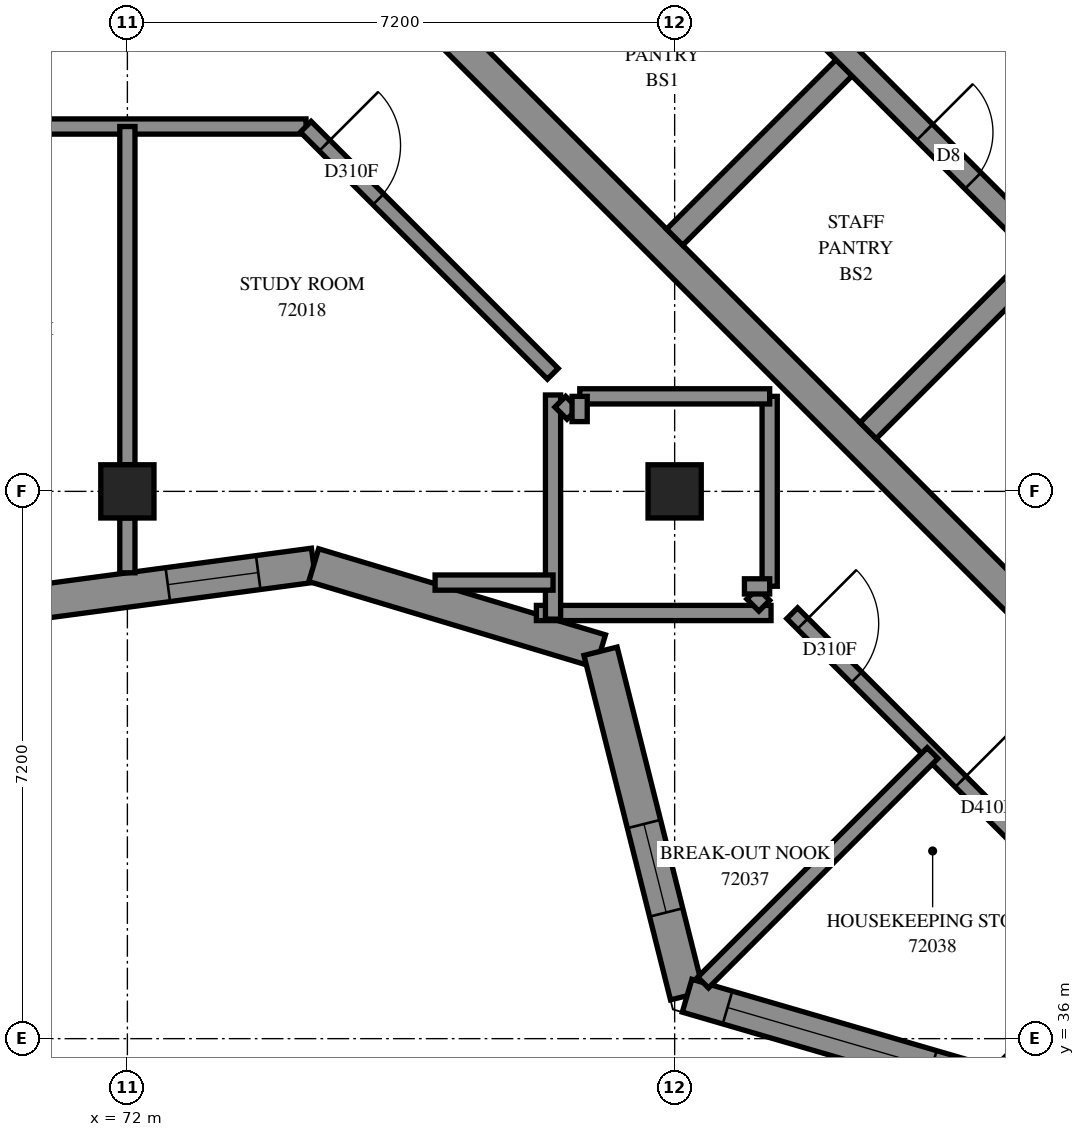
"""IFC4 building model, lengths in metres.
Left out: names, types, materials, properties, quantities, classifications, styles, units other than length and angle.
Written with IfcOpenShell. Run it as: python <this file> out.ifc"""

import sys

from ifc_helpers import new_model, si_unit, direction, frame, frame_2d, origin, origin_2d, place, context, subcontext, project, spatial, polyline, rectangle, outline, extrude, element, fill, save


model = new_model("IFC4")
c1 = context("Model", 3, precision=1e-05, world=origin(), true_north=direction((0.0, 1.0)))
c2 = subcontext(c1, "Body", "Model", "MODEL_VIEW")
j1 = project(units=[si_unit("LENGTHUNIT", "METRE"), si_unit("PLANEANGLEUNIT", "RADIAN")], contexts=[c1])
p1 = place(None, origin())
s1 = spatial("IfcSite", under=j1, at=p1, CompositionType="ELEMENT")
p2 = place(p1, origin())
s2 = spatial("IfcBuilding", under=s1, at=p2, CompositionType="ELEMENT")
p3 = place(p2, frame((0.0, 0.0, 264.2)))
s3 = spatial("IfcBuildingStorey", under=s2, at=p3, CompositionType="ELEMENT", Elevation=264.2)
for number, where, z_axis, x_axis in (
    (1, (72.0, 43.2, 0.0), (0.0, 0.0, 1.0), (1.0, 0.0, 0.0)),
    (2, (79.2, 43.2, 0.0), (0.0, 0.0, 1.0), (1.0, 0.0, 0.0)),
):
    element("IfcColumn", number, at=place(p3, frame(where, z_axis=z_axis, x_axis=x_axis)), inside=s3, PredefinedType="COLUMN", context=c2, shape_type="SweptSolid", body=[
        extrude(rectangle(XDim=0.7, YDim=0.7, at=origin_2d()), origin(), (0.0, 0.0, 1.0), 3.1),
    ])
p4 = place(p3, frame((76.23, 49.231, -0.3), z_axis=(0.0, 0.0, 1.0), x_axis=(0.7071034917, -0.7071100706, 0.0)))
e3 = element("IfcWall", 3, at=p4, inside=s3, PredefinedType="SHEAR", context=c2, shape_type="SweptSolid", body=[
    extrude(rectangle(XDim=15.2, YDim=0.4, at=frame_2d((7.6, 0.0))), origin(), (0.0, 0.0, 1.0), 2.7),
])
p5 = place(p3, frame((79.2, 46.544, 0.0), z_axis=(0.0, 0.0, 1.0), x_axis=(0.7071219326, 0.7070916295, 0.0)))
e4 = element("IfcWall", 4, at=p5, inside=s3, PredefinedType="SOLIDWALL", context=c2, shape_type="SweptSolid", body=[
    extrude(rectangle(XDim=3.3, YDim=0.3, at=frame_2d((1.65, 0.0))), origin(), (0.0, 0.0, 1.0), 3.1),
])
p6 = place(p3, frame((81.746, 43.999, 0.0), z_axis=(0.0, 0.0, 1.0), x_axis=(0.7071067812, 0.7071067812, 0.0)))
e5 = element("IfcWall", 5, at=p6, inside=s3, PredefinedType="SOLIDWALL", context=c2, shape_type="SweptSolid", body=[
    extrude(rectangle(XDim=3.3, YDim=0.3, at=frame_2d((1.65, 0.0))), origin(), (0.0, 0.0, 1.0), 3.1),
])
p7 = place(p3, frame((78.988, 51.423, 0.0), z_axis=(0.0, 0.0, 1.0), x_axis=(0.7071067812, -0.7071067812, 0.0)))
e6 = element("IfcWall", 6, at=p7, inside=s3, PredefinedType="SOLIDWALL", context=c2, shape_type="SweptSolid", body=[
    extrude(rectangle(XDim=14.4, YDim=0.3, at=frame_2d((7.2, 0.0))), origin(), (0.0, 0.0, 1.0), 3.1),
])
p8 = place(p7, frame((1.35, 0.0, 0.0)))
e7 = element("IfcOpeningElement", 7, at=p8, cuts=e6, PredefinedType="OPENING", context=c2, shape_type="SweptSolid", body=[
    extrude(rectangle(XDim=0.9, YDim=2.1, at=frame_2d((0.45, 1.05))), frame((0.0, 0.16, 0.0), z_axis=(0.0, -1.0, 0.0), x_axis=(1.0, 0.0, 0.0)), (0.0, 0.0, 1.0), 0.32),
])
p9 = place(p7, frame((4.95, 0.0, 0.0)))
e8 = element("IfcOpeningElement", 8, at=p9, cuts=e6, PredefinedType="OPENING", context=c2, shape_type="SweptSolid", body=[
    extrude(rectangle(XDim=0.9, YDim=2.1, at=frame_2d((0.45, 1.05))), frame((0.0, 0.16, 0.0), z_axis=(0.0, -1.0, 0.0), x_axis=(1.0, 0.0, 0.0)), (0.0, 0.0, 1.0), 0.32),
])
p10 = place(p7, frame((8.55, 0.0, 0.0)))
e9 = element("IfcOpeningElement", 9, at=p10, cuts=e6, PredefinedType="OPENING", context=c2, shape_type="SweptSolid", body=[
    extrude(rectangle(XDim=0.9, YDim=2.1, at=frame_2d((0.45, 1.05))), frame((0.0, 0.16, 0.0), z_axis=(0.0, -1.0, 0.0), x_axis=(1.0, 0.0, 0.0)), (0.0, 0.0, 1.0), 0.32),
])
p11 = place(p7, frame((12.05, 0.0, 0.0)))
e10 = element("IfcOpeningElement", 10, at=p11, cuts=e6, PredefinedType="OPENING", context=c2, shape_type="SweptSolid", body=[
    extrude(rectangle(XDim=1.1, YDim=2.1, at=frame_2d((0.55, 1.05))), frame((0.0, 0.16, 0.0), z_axis=(0.0, -1.0, 0.0), x_axis=(1.0, 0.0, 0.0)), (0.0, 0.0, 1.0), 0.32),
])
p12 = place(p3, frame((81.534, 53.969, 0.0), z_axis=(0.0, 0.0, 1.0), x_axis=(0.707103309, -0.7071102534, 0.0)))
e11 = element("IfcWall", 11, at=p12, inside=s3, PredefinedType="SOLIDWALL", context=c2, shape_type="SweptSolid", body=[
    extrude(rectangle(XDim=14.4, YDim=0.3, at=frame_2d((7.2, 0.0))), origin(), (0.0, 0.0, 1.0), 3.1),
])
p13 = place(p12, frame((8.55, 0.0, 0.0)))
e12 = element("IfcOpeningElement", 12, at=p13, cuts=e11, PredefinedType="OPENING", context=c2, shape_type="SweptSolid", body=[
    extrude(rectangle(XDim=0.9, YDim=2.1, at=frame_2d((0.45, 1.05))), frame((0.0, 0.16, 0.0), z_axis=(0.0, -1.0, 0.0), x_axis=(1.0, 0.0, 0.0)), (0.0, 0.0, 1.0), 0.32),
])
p14 = place(p12, frame((1.25, 0.0, 0.0)))
e13 = element("IfcOpeningElement", 13, at=p14, cuts=e11, PredefinedType="OPENING", context=c2, shape_type="SweptSolid", body=[
    extrude(rectangle(XDim=1.1, YDim=2.1, at=frame_2d((0.55, 1.05))), frame((0.0, 0.16, 0.0), z_axis=(0.0, -1.0, 0.0), x_axis=(1.0, 0.0, 0.0)), (0.0, 0.0, 1.0), 0.32),
])
p15 = place(p12, frame((4.85, 0.0, 0.0)))
e14 = element("IfcOpeningElement", 14, at=p15, cuts=e11, PredefinedType="OPENING", context=c2, shape_type="SweptSolid", body=[
    extrude(rectangle(XDim=1.1, YDim=2.1, at=frame_2d((0.55, 1.05))), frame((0.0, 0.16, 0.0), z_axis=(0.0, -1.0, 0.0), x_axis=(1.0, 0.0, 0.0)), (0.0, 0.0, 1.0), 0.32),
])
p16 = place(p12, frame((12.05, 0.0, 0.0)))
e15 = element("IfcOpeningElement", 15, at=p16, cuts=e11, PredefinedType="OPENING", context=c2, shape_type="SweptSolid", body=[
    extrude(rectangle(XDim=1.1, YDim=2.1, at=frame_2d((0.55, 1.05))), frame((0.0, 0.16, 0.0), z_axis=(0.0, -1.0, 0.0), x_axis=(1.0, 0.0, 0.0)), (0.0, 0.0, 1.0), 0.32),
])
p17 = place(p3, frame((70.828, 41.745, 0.0), z_axis=(0.0, 0.0, 1.0), x_axis=(0.991180049, 0.1325221131, 0.0)))
e16 = element("IfcWall", 16, at=p17, inside=s3, PredefinedType="SOLIDWALL", context=c2, shape_type="SweptSolid", body=[
    extrude(outline(polyline([(-0.03, -0.225), (3.607, -0.225), (3.704, 0.225), (0.03, 0.225), (-0.03, -0.225)])), origin(), (0.0, 0.0, 1.0), 3.1),
])
p18 = place(p17, frame((1.719, 0.0, 0.45)))
e17 = element("IfcOpeningElement", 17, at=p18, cuts=e16, PredefinedType="OPENING", context=c2, shape_type="SweptSolid", body=[
    extrude(rectangle(XDim=1.2, YDim=2.55, at=frame_2d((0.6, 1.275))), frame((0.0, 0.235, 0.0), z_axis=(0.0, -1.0, 0.0), x_axis=(1.0, 0.0, 0.0)), (0.0, 0.0, 1.0), 0.47),
])
p19 = place(p3, frame((74.451, 42.229, 0.0), z_axis=(0.0, 0.0, 1.0), x_axis=(0.957789952, -0.2874689685, 0.0)))
e18 = element("IfcWall", 18, at=p19, inside=s3, PredefinedType="SOLIDWALL", context=c2, shape_type="SweptSolid", body=[
    extrude(outline(polyline([(0.049, -0.225), (3.812, -0.225), (4.068, 0.225), (-0.049, 0.225), (0.049, -0.225)])), origin(), (0.0, 0.0, 1.0), 3.1),
])
p20 = place(p3, frame((78.225, 41.097, 0.0), z_axis=(0.0, 0.0, 1.0), x_axis=(0.2436835103, -0.9698548071, 0.0)))
e19 = element("IfcWall", 19, at=p20, inside=s3, PredefinedType="SOLIDWALL", context=c2, shape_type="SweptSolid", body=[
    extrude(outline(polyline([(0.128, -0.225), (4.802, -0.225), (4.544, 0.225), (-0.128, 0.225), (0.128, -0.225)])), origin(), (0.0, 0.0, 1.0), 3.1),
])
p21 = place(p20, frame((2.344, 0.0, 0.45)))
e20 = element("IfcOpeningElement", 20, at=p21, cuts=e19, PredefinedType="OPENING", context=c2, shape_type="SweptSolid", body=[
    extrude(rectangle(XDim=1.2, YDim=2.55, at=frame_2d((0.6, 1.275))), frame((0.0, 0.235, 0.0), z_axis=(0.0, -1.0, 0.0), x_axis=(1.0, 0.0, 0.0)), (0.0, 0.0, 1.0), 0.47),
])
p22 = place(p3, frame((79.364, 36.565, 0.0), z_axis=(0.0, 0.0, 1.0), x_axis=(0.9600215683, -0.2799260409, 0.0)))
e21 = element("IfcWall", 21, at=p22, inside=s3, PredefinedType="SOLIDWALL", context=c2, shape_type="SweptSolid", body=[
    extrude(outline(polyline([(-0.129, -0.225), (4.446, -0.225), (4.692, 0.225), (0.129, 0.225), (-0.129, -0.225)])), origin(), (0.0, 0.0, 1.0), 3.1),
])
p23 = place(p22, frame((0.554, 0.0, 0.45)))
e22 = element("IfcOpeningElement", 22, at=p23, cuts=e21, PredefinedType="OPENING", context=c2, shape_type="SweptSolid", body=[
    extrude(rectangle(XDim=2.8, YDim=2.55, at=frame_2d((1.4, 1.275))), frame((0.0, 0.235, 0.0), z_axis=(0.0, -1.0, 0.0), x_axis=(1.0, 0.0, 0.0)), (0.0, 0.0, 1.0), 0.47),
])
p24 = place(p3, frame((55.2, 48.0, 0.0), z_axis=(0.0, 0.0, 1.0), x_axis=(1.0, 0.0, 0.0)))
e23 = element("IfcWall", 23, at=p24, inside=s3, PredefinedType="PARTITIONING", context=c2, shape_type="SweptSolid", body=[
    extrude(rectangle(XDim=19.15, YDim=0.2, at=frame_2d((9.575, 0.0))), origin(), (0.0, 0.0, 1.0), 3.1),
])
p25 = place(p24, frame((4.475, 0.0, 0.0)))
e24 = element("IfcOpeningElement", 24, at=p25, cuts=e23, PredefinedType="OPENING", context=c2, shape_type="SweptSolid", body=[
    extrude(rectangle(XDim=1.0, YDim=2.1, at=frame_2d((0.5, 1.05))), frame((0.0, 0.11, 0.0), z_axis=(0.0, -1.0, 0.0), x_axis=(1.0, 0.0, 0.0)), (0.0, 0.0, 1.0), 0.22),
])
p26 = place(p24, frame((8.338, 0.0, 0.0)))
e25 = element("IfcOpeningElement", 25, at=p26, cuts=e23, PredefinedType="OPENING", context=c2, shape_type="SweptSolid", body=[
    extrude(rectangle(XDim=1.0, YDim=2.1, at=frame_2d((0.5, 1.05))), frame((0.0, 0.11, 0.0), z_axis=(0.0, -1.0, 0.0), x_axis=(1.0, 0.0, 0.0)), (0.0, 0.0, 1.0), 0.22),
])
p27 = place(p24, frame((13.707, 0.0, 0.0)))
e26 = element("IfcOpeningElement", 26, at=p27, cuts=e23, PredefinedType="OPENING", context=c2, shape_type="SweptSolid", body=[
    extrude(rectangle(XDim=1.0, YDim=2.1, at=frame_2d((0.5, 1.05))), frame((0.0, 0.11, 0.0), z_axis=(0.0, -1.0, 0.0), x_axis=(1.0, 0.0, 0.0)), (0.0, 0.0, 1.0), 0.22),
])
p28 = place(p3, frame((80.747, 41.597, 0.0), z_axis=(0.0, 0.0, 1.0), x_axis=(0.7071067812, -0.7071067812, 0.0)))
e27 = element("IfcWall", 27, at=p28, inside=s3, PredefinedType="PARTITIONING", context=c2, shape_type="SweptSolid", body=[
    extrude(rectangle(XDim=8.607, YDim=0.2, at=frame_2d((4.303, 0.0))), origin(), (0.0, 0.0, 1.0), 3.1),
])
p29 = place(p28, frame((0.195, 0.0, 0.0)))
e28 = element("IfcOpeningElement", 28, at=p29, cuts=e27, PredefinedType="OPENING", context=c2, shape_type="SweptSolid", body=[
    extrude(rectangle(XDim=1.0, YDim=2.1, at=frame_2d((0.5, 1.05))), frame((0.0, 0.11, 0.0), z_axis=(0.0, -1.0, 0.0), x_axis=(1.0, 0.0, 0.0)), (0.0, 0.0, 1.0), 0.22),
])
p30 = place(p28, frame((3.133, 0.0, 0.0)))
e29 = element("IfcOpeningElement", 29, at=p30, cuts=e27, PredefinedType="OPENING", context=c2, shape_type="SweptSolid", body=[
    extrude(rectangle(XDim=1.0, YDim=2.1, at=frame_2d((0.5, 1.05))), frame((0.0, 0.11, 0.0), z_axis=(0.0, -1.0, 0.0), x_axis=(1.0, 0.0, 0.0)), (0.0, 0.0, 1.0), 0.22),
])
p31 = place(p3, frame((74.347, 47.997, 0.0), z_axis=(0.0, 0.0, 1.0), x_axis=(0.7071067812, -0.7071067812, 0.0)))
e30 = element("IfcWall", 30, at=p31, inside=s3, PredefinedType="PARTITIONING", context=c2, shape_type="SweptSolid", body=[
    extrude(rectangle(XDim=4.596, YDim=0.2, at=frame_2d((2.298, 0.0))), origin(), (0.0, 0.0, 1.0), 3.1),
])
p32 = place(p31, frame((0.35, 0.0, 0.0)))
e31 = element("IfcOpeningElement", 31, at=p32, cuts=e30, PredefinedType="OPENING", context=c2, shape_type="SweptSolid", body=[
    extrude(rectangle(XDim=1.0, YDim=2.1, at=frame_2d((0.5, 1.05))), frame((0.0, 0.11, 0.0), z_axis=(0.0, -1.0, 0.0), x_axis=(1.0, 0.0, 0.0)), (0.0, 0.0, 1.0), 0.22),
])
p33 = place(p3, frame((72.0, 43.55, 0.0), z_axis=(0.0, 0.0, 1.0), x_axis=(0.0, 1.0, 0.0)))
e32 = element("IfcWall", 32, at=p33, inside=s3, PredefinedType="PARTITIONING", context=c2, shape_type="SweptSolid", body=[
    extrude(rectangle(XDim=4.45, YDim=0.2, at=frame_2d((2.225, 0.0))), origin(), (0.0, 0.0, 1.0), 3.1),
])
p34 = place(p3, frame((79.574, 36.738, 0.0), z_axis=(0.0, 0.0, 1.0), x_axis=(0.7071067812, 0.7071067812, 0.0)))
e33 = element("IfcWall", 33, at=p34, inside=s3, PredefinedType="PARTITIONING", context=c2, shape_type="SweptSolid", body=[
    extrude(rectangle(XDim=4.269, YDim=0.2, at=frame_2d((2.135, 0.0))), origin(), (0.0, 0.0, 1.0), 3.1),
])
p35 = place(p3, frame((77.381, 41.6, 0.0), z_axis=(0.0, 0.0, 1.0), x_axis=(1.0, 0.0, 0.0)))
e34 = element("IfcWall", 34, at=p35, inside=s3, PredefinedType="PARTITIONING", context=c2, shape_type="SweptSolid", body=[
    extrude(rectangle(XDim=3.087, YDim=0.2, at=frame_2d((1.543, 0.0))), origin(), (0.0, 0.0, 1.0), 3.1),
])
p36 = place(p3, frame((77.6, 41.519, 0.0), z_axis=(0.0, 0.0, 1.0), x_axis=(0.0, 1.0, 0.0)))
e35 = element("IfcWall", 35, at=p36, inside=s3, PredefinedType="PARTITIONING", context=c2, shape_type="SweptSolid", body=[
    extrude(rectangle(XDim=2.949, YDim=0.2, at=frame_2d((1.474, 0.0))), origin(), (0.0, 0.0, 1.0), 3.1),
])
for number, where, z_axis, x_axis in (
    (36, (80.45, 41.952, 0.0), (0.0, 0.0, 1.0), (0.0, 1.0, 0.0)),
    (37, (77.952, 44.45, 0.0), (0.0, 0.0, 1.0), (1.0, 0.0, 0.0)),
):
    element("IfcWall", number, at=place(p3, frame(where, z_axis=z_axis, x_axis=x_axis)), inside=s3, PredefinedType="PARTITIONING", context=c2, shape_type="SweptSolid", body=[
        extrude(rectangle(XDim=2.498, YDim=0.2, at=frame_2d((1.249, 0.0))), origin(), (0.0, 0.0, 1.0), 3.1),
    ])
p37 = place(p3, frame((76.048, 42.0, 0.0), z_axis=(0.0, 0.0, 1.0), x_axis=(1.0, 0.0, 0.0)))
e38 = element("IfcWall", 38, at=p37, inside=s3, PredefinedType="PARTITIONING", context=c2, shape_type="SweptSolid", body=[
    extrude(rectangle(XDim=1.552, YDim=0.2, at=frame_2d((0.776, 0.0))), origin(), (0.0, 0.0, 1.0), 3.1),
])
p38 = place(p3, frame((72.0, 42.129, 0.0), z_axis=(0.0, 0.0, 1.0), x_axis=(0.0, 1.0, 0.0)))
e39 = element("IfcWall", 39, at=p38, inside=s3, PredefinedType="PARTITIONING", context=c2, shape_type="SweptSolid", body=[
    extrude(rectangle(XDim=0.721, YDim=0.2, at=frame_2d((0.361, 0.0))), origin(), (0.0, 0.0, 1.0), 3.1),
])
p39 = place(p3, frame((83.516, 35.588, 0.0), z_axis=(0.0, 0.0, 1.0), x_axis=(0.7070235383, 0.7071900143, 0.0)))
e40 = element("IfcWall", 40, at=p39, inside=s3, PredefinedType="PARTITIONING", context=c2, shape_type="SweptSolid", body=[
    extrude(rectangle(XDim=0.601, YDim=0.2, at=frame_2d((0.3, 0.0))), origin(), (0.0, 0.0, 1.0), 3.1),
])
for number, where, z_axis, x_axis in (
    (41, (80.221, 41.855, 0.0), (0.0, 0.0, 1.0), (0.707, -0.707, 0.0)),
    (42, (77.695, 44.38, 0.0), (0.0, 0.0, 1.0), (0.707, -0.707, 0.0)),
):
    element("IfcWall", number, at=place(p3, frame(where, z_axis=z_axis, x_axis=x_axis)), inside=s3, PredefinedType="PARTITIONING", context=c2, shape_type="SweptSolid", body=[
        extrude(rectangle(XDim=0.225, YDim=0.2, at=frame_2d((0.112, 0.0))), origin(), (0.0, 0.0, 1.0), 3.1),
    ])
for number, where, z_axis, x_axis in (
    (43, (80.118, 41.95, 0.0), (0.0, 0.0, 1.0), (1.0, 0.0, 0.0)),
    (44, (77.95, 44.118, 0.0), (0.0, 0.0, 1.0), (0.0, 1.0, 0.0)),
):
    element("IfcWall", number, at=place(p3, frame(where, z_axis=z_axis, x_axis=x_axis)), inside=s3, PredefinedType="PARTITIONING", context=c2, shape_type="SweptSolid", body=[
        extrude(rectangle(XDim=0.332, YDim=0.2, at=frame_2d((0.166, 0.0))), origin(), (0.0, 0.0, 1.0), 3.1),
    ])
p40 = place(p18, origin())
e45 = element("IfcWindow", 45, at=p40, inside=s3, PartitioningType="SINGLE_PANEL", PredefinedType="WINDOW", context=c2, shape_type="SweptSolid", body=[
    extrude(rectangle(XDim=1.2, YDim=2.55, at=frame_2d((0.6, 1.275))), frame((0.0, 0.205, 0.0), z_axis=(0.0, -1.0, 0.0), x_axis=(1.0, 0.0, 0.0)), (0.0, 0.0, 1.0), 0.06),
])
fill(e17, e45)
p41 = place(p21, origin())
e46 = element("IfcWindow", 46, at=p41, inside=s3, PartitioningType="SINGLE_PANEL", PredefinedType="WINDOW", context=c2, shape_type="SweptSolid", body=[
    extrude(rectangle(XDim=1.2, YDim=2.55, at=frame_2d((0.6, 1.275))), frame((0.0, 0.205, 0.0), z_axis=(0.0, -1.0, 0.0), x_axis=(1.0, 0.0, 0.0)), (0.0, 0.0, 1.0), 0.06),
])
fill(e20, e46)
p42 = place(p23, origin())
e47 = element("IfcWindow", 47, at=p42, inside=s3, PartitioningType="SINGLE_PANEL", PredefinedType="WINDOW", context=c2, shape_type="SweptSolid", body=[
    extrude(rectangle(XDim=2.8, YDim=2.55, at=frame_2d((1.4, 1.275))), frame((0.0, 0.205, 0.0), z_axis=(0.0, -1.0, 0.0), x_axis=(1.0, 0.0, 0.0)), (0.0, 0.0, 1.0), 0.06),
])
fill(e22, e47)
p43 = place(p9, origin())
e48 = element("IfcDoor", 48, at=p43, inside=s3, OperationType="SINGLE_SWING_LEFT", PredefinedType="DOOR", context=c2, shape_type="SweptSolid", body=[
    extrude(rectangle(XDim=0.9, YDim=2.1, at=frame_2d((0.45, 1.05))), frame((0.0, 0.025, 0.0), z_axis=(0.0, -1.0, 0.0), x_axis=(1.0, 0.0, 0.0)), (0.0, 0.0, 1.0), 0.05),
])
fill(e8, e48)
p44 = place(p32, origin())
e49 = element("IfcDoor", 49, at=p44, inside=s3, OperationType="SINGLE_SWING_LEFT", PredefinedType="DOOR", context=c2, shape_type="SweptSolid", body=[
    extrude(rectangle(XDim=1.0, YDim=2.1, at=frame_2d((0.5, 1.05))), frame((0.0, 0.025, 0.0), z_axis=(0.0, -1.0, 0.0), x_axis=(1.0, 0.0, 0.0)), (0.0, 0.0, 1.0), 0.05),
])
fill(e31, e49)
p45 = place(p29, origin())
e50 = element("IfcDoor", 50, at=p45, inside=s3, OperationType="SINGLE_SWING_LEFT", PredefinedType="DOOR", context=c2, shape_type="SweptSolid", body=[
    extrude(rectangle(XDim=1.0, YDim=2.1, at=frame_2d((0.5, 1.05))), frame((0.0, 0.025, 0.0), z_axis=(0.0, -1.0, 0.0), x_axis=(1.0, 0.0, 0.0)), (0.0, 0.0, 1.0), 0.05),
])
fill(e28, e50)
p46 = place(p30, origin())
e51 = element("IfcDoor", 51, at=p46, inside=s3, OperationType="SINGLE_SWING_LEFT", PredefinedType="DOOR", context=c2, shape_type="SweptSolid", body=[
    extrude(rectangle(XDim=1.0, YDim=2.1, at=frame_2d((0.5, 1.05))), frame((0.0, 0.025, 0.0), z_axis=(0.0, -1.0, 0.0), x_axis=(1.0, 0.0, 0.0)), (0.0, 0.0, 1.0), 0.05),
])
fill(e29, e51)
save(model, sys.argv[1])
